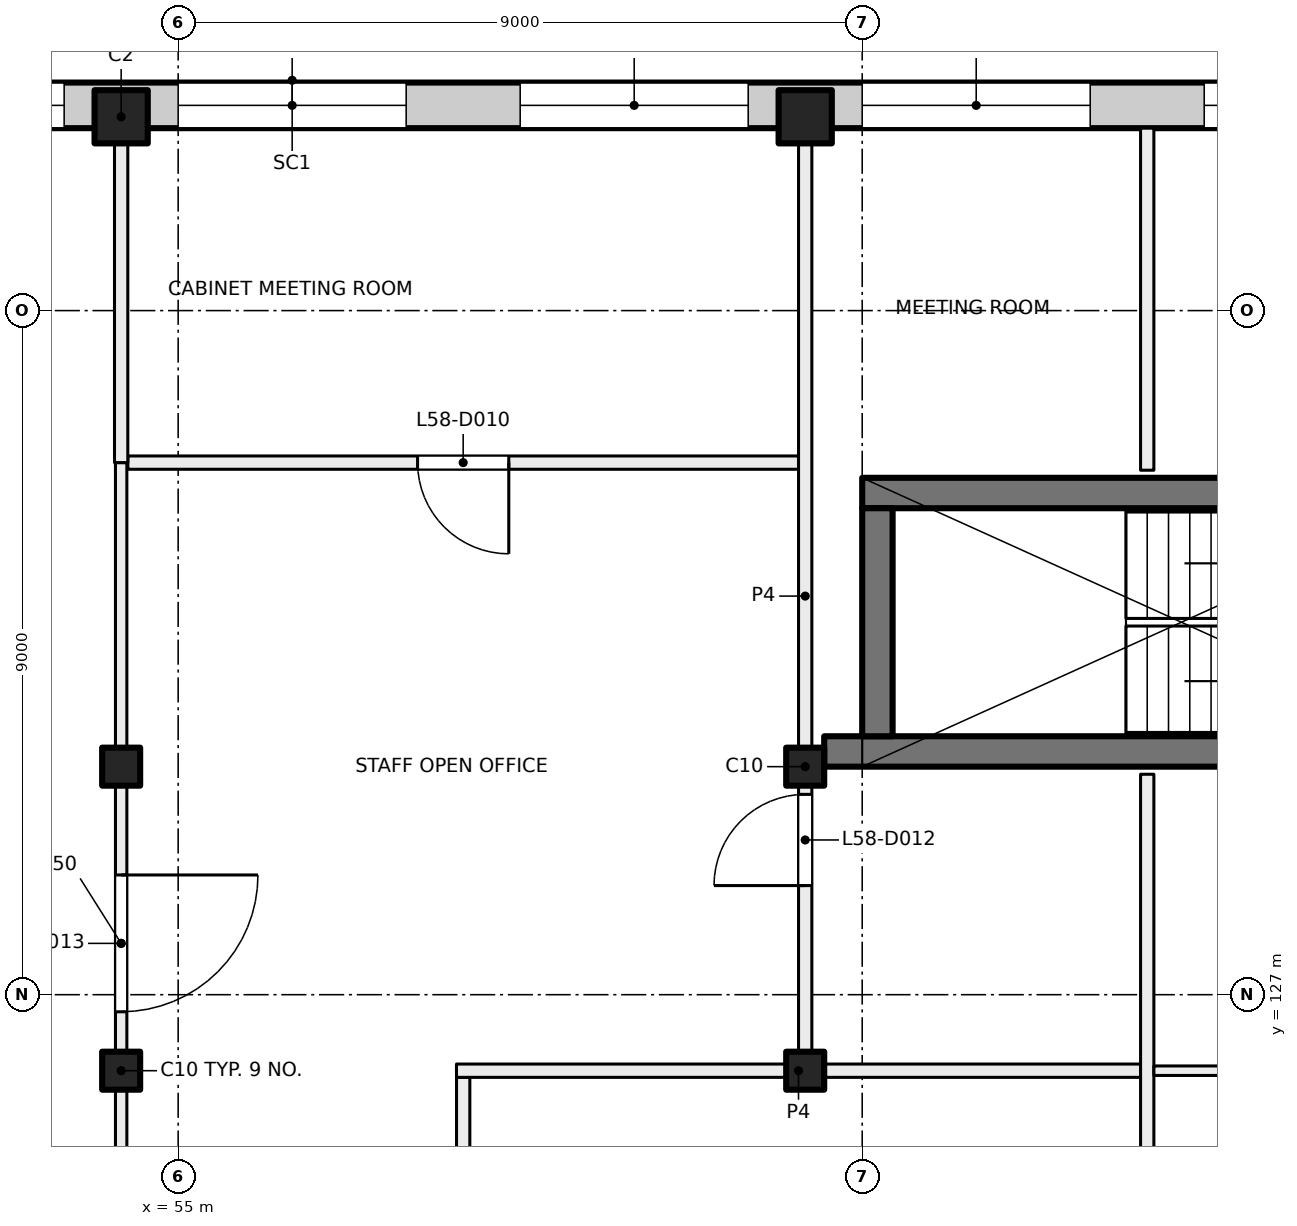
"""IFC4 building model, lengths in metres.
Left out: names, types, materials, properties, quantities, classifications, styles, units other than length and angle.
Written with IfcOpenShell. Run it as: python <this file> out.ifc"""

import sys

from ifc_helpers import new_model, si_unit, direction, frame, frame_2d, origin, origin_2d, place, context, subcontext, project, spatial, rectangle, extrude, element, fill, save


model = new_model("IFC4")
c1 = context("Model", 3, precision=1e-05, world=origin(), true_north=direction((0.0, 1.0)))
c2 = subcontext(c1, "Body", "Model", "MODEL_VIEW")
j1 = project(units=[si_unit("LENGTHUNIT", "METRE"), si_unit("PLANEANGLEUNIT", "RADIAN")], contexts=[c1])
p1 = place(None, origin())
s1 = spatial("IfcSite", under=j1, at=p1, CompositionType="ELEMENT")
p2 = place(p1, origin())
s2 = spatial("IfcBuilding", under=s1, at=p2, CompositionType="ELEMENT")
p3 = place(p2, frame((0.0, 0.0, 245.5)))
s3 = spatial("IfcBuildingStorey", under=s2, at=p3, CompositionType="ELEMENT", Elevation=245.5)
for number, where, z_axis, x_axis in (
    (1, (54.25, 130.0, 0.0), (0.0, 0.0, 1.0), (1.0, 0.0, 0.0)),
    (2, (63.25, 130.0, 0.0), (0.0, 0.0, 1.0), (1.0, 0.0, 0.0)),
    (3, (54.25, 126.0, 0.0), (0.0, 0.0, 1.0), (1.0, 0.0, 0.0)),
    (4, (63.25, 126.0, 0.0), (0.0, 0.0, 1.0), (1.0, 0.0, 0.0)),
):
    element("IfcColumn", number, at=place(p3, frame(where, z_axis=z_axis, x_axis=x_axis)), inside=s3, PredefinedType="COLUMN", context=c2, shape_type="SweptSolid", body=[
        extrude(rectangle(XDim=0.5, YDim=0.5, at=origin_2d()), origin(), (0.0, 0.0, 1.0), 4.0),
    ])
for number, where, z_axis, x_axis in (
    (5, (54.25, 138.55, 0.0), (0.0, 0.0, 1.0), (1.0, 0.0, 0.0)),
    (6, (63.25, 138.55, 0.0), (0.0, 0.0, 1.0), (1.0, 0.0, 0.0)),
):
    element("IfcColumn", number, at=place(p3, frame(where, z_axis=z_axis, x_axis=x_axis)), inside=s3, PredefinedType="COLUMN", context=c2, shape_type="SweptSolid", body=[
        extrude(rectangle(XDim=0.7, YDim=0.7, at=origin_2d()), origin(), (0.0, 0.0, 1.0), 4.0),
    ])
p4 = place(p3, frame((63.5, 130.2, 0.0), z_axis=(0.0, 0.0, 1.0), x_axis=(1.0, 0.0, 0.0)))
e7 = element("IfcWall", 7, at=p4, inside=s3, PredefinedType="SHEAR", context=c2, shape_type="SweptSolid", body=[
    extrude(rectangle(XDim=8.9, YDim=0.4, at=frame_2d((4.45, 0.0))), origin(), (0.0, 0.0, 1.0), 4.0),
])
p5 = place(p4, frame((7.275, 0.0, 0.0)))
e8 = element("IfcOpeningElement", 8, at=p5, cuts=e7, PredefinedType="OPENING", context=c2, shape_type="SweptSolid", body=[
    extrude(rectangle(XDim=1.0, YDim=2.1, at=frame_2d((0.5, 1.05))), frame((0.0, 0.21, 0.0), z_axis=(0.0, -1.0, 0.0), x_axis=(1.0, 0.0, 0.0)), (0.0, 0.0, 1.0), 0.42),
])
p6 = place(p3, frame((64.0, 133.6, 0.0), z_axis=(0.0, 0.0, 1.0), x_axis=(1.0, 0.0, 0.0)))
e9 = element("IfcWall", 9, at=p6, inside=s3, PredefinedType="SHEAR", context=c2, shape_type="SweptSolid", body=[
    extrude(rectangle(XDim=8.4, YDim=0.4, at=frame_2d((4.2, 0.0))), origin(), (0.0, 0.0, 1.0), 4.0),
])
p7 = place(p3, frame((64.2, 130.4, 0.0), z_axis=(0.0, 0.0, 1.0), x_axis=(0.0, 1.0, 0.0)))
e10 = element("IfcWall", 10, at=p7, inside=s3, PredefinedType="SHEAR", context=c2, shape_type="SweptSolid", body=[
    extrude(rectangle(XDim=3.0, YDim=0.4, at=frame_2d((1.5, 0.0))), origin(), (0.0, 0.0, 1.0), 4.0),
])
p8 = place(p3, frame((47.07, 138.7, 0.0), z_axis=(0.0, 0.0, 1.0), x_axis=(1.0, 0.0, 0.0)))
e11 = element("IfcWall", 11, at=p8, inside=s3, PredefinedType="SOLIDWALL", context=c2, shape_type="SweptSolid", body=[
    extrude(rectangle(XDim=43.91, YDim=0.6, at=frame_2d((21.955, 0.0))), origin(), (0.0, 0.0, 1.0), 3.625),
])
p9 = place(p8, frame((3.43, 0.0, 0.9)))
e12 = element("IfcOpeningElement", 12, at=p9, cuts=e11, PredefinedType="OPENING", context=c2, shape_type="SweptSolid", body=[
    extrude(rectangle(XDim=3.0, YDim=2.4, at=frame_2d((1.5, 1.2))), frame((0.0, 0.31, 0.0), z_axis=(0.0, -1.0, 0.0), x_axis=(1.0, 0.0, 0.0)), (0.0, 0.0, 1.0), 0.62),
])
p10 = place(p8, frame((7.93, 0.0, 0.9)))
e13 = element("IfcOpeningElement", 13, at=p10, cuts=e11, PredefinedType="OPENING", context=c2, shape_type="SweptSolid", body=[
    extrude(rectangle(XDim=3.0, YDim=2.4, at=frame_2d((1.5, 1.2))), frame((0.0, 0.31, 0.0), z_axis=(0.0, -1.0, 0.0), x_axis=(1.0, 0.0, 0.0)), (0.0, 0.0, 1.0), 0.62),
])
p11 = place(p8, frame((12.43, 0.0, 0.9)))
e14 = element("IfcOpeningElement", 14, at=p11, cuts=e11, PredefinedType="OPENING", context=c2, shape_type="SweptSolid", body=[
    extrude(rectangle(XDim=3.0, YDim=2.4, at=frame_2d((1.5, 1.2))), frame((0.0, 0.31, 0.0), z_axis=(0.0, -1.0, 0.0), x_axis=(1.0, 0.0, 0.0)), (0.0, 0.0, 1.0), 0.62),
])
p12 = place(p8, frame((16.93, 0.0, 0.9)))
e15 = element("IfcOpeningElement", 15, at=p12, cuts=e11, PredefinedType="OPENING", context=c2, shape_type="SweptSolid", body=[
    extrude(rectangle(XDim=3.0, YDim=2.4, at=frame_2d((1.5, 1.2))), frame((0.0, 0.31, 0.0), z_axis=(0.0, -1.0, 0.0), x_axis=(1.0, 0.0, 0.0)), (0.0, 0.0, 1.0), 0.62),
])
p13 = place(p8, frame((21.43, 0.0, 0.9)))
e16 = element("IfcOpeningElement", 16, at=p13, cuts=e11, PredefinedType="OPENING", context=c2, shape_type="SweptSolid", body=[
    extrude(rectangle(XDim=3.0, YDim=2.4, at=frame_2d((1.5, 1.2))), frame((0.0, 0.31, 0.0), z_axis=(0.0, -1.0, 0.0), x_axis=(1.0, 0.0, 0.0)), (0.0, 0.0, 1.0), 0.62),
])
p14 = place(p8, frame((25.93, 0.0, 0.9)))
e17 = element("IfcOpeningElement", 17, at=p14, cuts=e11, PredefinedType="OPENING", context=c2, shape_type="SweptSolid", body=[
    extrude(rectangle(XDim=3.0, YDim=2.4, at=frame_2d((1.5, 1.2))), frame((0.0, 0.31, 0.0), z_axis=(0.0, -1.0, 0.0), x_axis=(1.0, 0.0, 0.0)), (0.0, 0.0, 1.0), 0.62),
])
p15 = place(p8, frame((30.43, 0.0, 0.9)))
e18 = element("IfcOpeningElement", 18, at=p15, cuts=e11, PredefinedType="OPENING", context=c2, shape_type="SweptSolid", body=[
    extrude(rectangle(XDim=3.0, YDim=2.4, at=frame_2d((1.5, 1.2))), frame((0.0, 0.31, 0.0), z_axis=(0.0, -1.0, 0.0), x_axis=(1.0, 0.0, 0.0)), (0.0, 0.0, 1.0), 0.62),
])
p16 = place(p8, frame((34.93, 0.0, 0.9)))
e19 = element("IfcOpeningElement", 19, at=p16, cuts=e11, PredefinedType="OPENING", context=c2, shape_type="SweptSolid", body=[
    extrude(rectangle(XDim=3.0, YDim=2.4, at=frame_2d((1.5, 1.2))), frame((0.0, 0.31, 0.0), z_axis=(0.0, -1.0, 0.0), x_axis=(1.0, 0.0, 0.0)), (0.0, 0.0, 1.0), 0.62),
])
p17 = place(p8, frame((39.43, 0.0, 0.9)))
e20 = element("IfcOpeningElement", 20, at=p17, cuts=e11, PredefinedType="OPENING", context=c2, shape_type="SweptSolid", body=[
    extrude(rectangle(XDim=3.0, YDim=2.4, at=frame_2d((1.5, 1.2))), frame((0.0, 0.31, 0.0), z_axis=(0.0, -1.0, 0.0), x_axis=(1.0, 0.0, 0.0)), (0.0, 0.0, 1.0), 0.62),
])
p18 = place(p3, frame((54.25, 134.0, 0.0), z_axis=(0.0, 0.0, 1.0), x_axis=(0.0, -1.0, 0.0)))
e21 = element("IfcWall", 21, at=p18, inside=s3, PredefinedType="PARTITIONING", context=c2, shape_type="SweptSolid", body=[
    extrude(rectangle(XDim=12.65, YDim=0.15, at=frame_2d((6.325, 0.0))), origin(), (0.0, 0.0, 1.0), 3.625),
])
p19 = place(p18, frame((5.425, 0.0, 0.0)))
e22 = element("IfcOpeningElement", 22, at=p19, cuts=e21, PredefinedType="OPENING", context=c2, shape_type="SweptSolid", body=[
    extrude(rectangle(XDim=1.8, YDim=2.1, at=frame_2d((0.9, 1.05))), frame((0.0, 0.085, 0.0), z_axis=(0.0, -1.0, 0.0), x_axis=(1.0, 0.0, 0.0)), (0.0, 0.0, 1.0), 0.17),
])
p20 = place(p3, frame((63.162, 134.0, 0.0), z_axis=(0.0, 0.0, 1.0), x_axis=(-1.0, 0.0, 0.0)))
e23 = element("IfcWall", 23, at=p20, inside=s3, PredefinedType="PARTITIONING", context=c2, shape_type="SweptSolid", body=[
    extrude(rectangle(XDim=8.824, YDim=0.175, at=frame_2d((4.412, 0.0))), origin(), (0.0, 0.0, 1.0), 3.625),
])
p21 = place(p20, frame((3.812, 0.0, 0.0)))
e24 = element("IfcOpeningElement", 24, at=p21, cuts=e23, PredefinedType="OPENING", context=c2, shape_type="SweptSolid", body=[
    extrude(rectangle(XDim=1.2, YDim=2.1, at=frame_2d((0.6, 1.05))), frame((0.0, 0.097, 0.0), z_axis=(0.0, -1.0, 0.0), x_axis=(1.0, 0.0, 0.0)), (0.0, 0.0, 1.0), 0.195),
])
p22 = place(p3, frame((54.25, 138.4, 0.0), z_axis=(0.0, 0.0, 1.0), x_axis=(0.0, -1.0, 0.0)))
e25 = element("IfcWall", 25, at=p22, inside=s3, PredefinedType="PARTITIONING", context=c2, shape_type="SweptSolid", body=[
    extrude(rectangle(XDim=4.4, YDim=0.175, at=frame_2d((2.2, 0.0))), origin(), (0.0, 0.0, 1.0), 3.625),
])
p23 = place(p3, frame((58.75, 125.912, 0.0), z_axis=(0.0, 0.0, 1.0), x_axis=(0.0, -1.0, 0.0)))
e26 = element("IfcWall", 26, at=p23, inside=s3, PredefinedType="PARTITIONING", context=c2, shape_type="SweptSolid", body=[
    extrude(rectangle(XDim=4.412, YDim=0.175, at=frame_2d((2.206, 0.0))), origin(), (0.0, 0.0, 1.0), 3.625),
])
p24 = place(p3, frame((58.662, 126.0, 0.0), z_axis=(0.0, 0.0, 1.0), x_axis=(1.0, 0.0, 0.0)))
e27 = element("IfcWall", 27, at=p24, inside=s3, PredefinedType="PARTITIONING", context=c2, shape_type="SweptSolid", body=[
    extrude(rectangle(XDim=9.0, YDim=0.175, at=frame_2d((4.5, 0.0))), origin(), (0.0, 0.0, 1.0), 3.625),
])
p25 = place(p3, frame((63.25, 126.088, 0.0), z_axis=(0.0, 0.0, 1.0), x_axis=(0.0, 1.0, 0.0)))
e28 = element("IfcWall", 28, at=p25, inside=s3, PredefinedType="PARTITIONING", context=c2, shape_type="SweptSolid", body=[
    extrude(rectangle(XDim=12.312, YDim=0.175, at=frame_2d((6.156, 0.0))), origin(), (0.0, 0.0, 1.0), 3.625),
])
p26 = place(p25, frame((2.347, 0.0, 0.0)))
e29 = element("IfcOpeningElement", 29, at=p26, cuts=e28, PredefinedType="OPENING", context=c2, shape_type="SweptSolid", body=[
    extrude(rectangle(XDim=1.2, YDim=2.1, at=frame_2d((0.6, 1.05))), frame((0.0, 0.097, 0.0), z_axis=(0.0, -1.0, 0.0), x_axis=(1.0, 0.0, 0.0)), (0.0, 0.0, 1.0), 0.195),
])
p27 = place(p3, frame((67.75, 121.5, 0.0), z_axis=(0.0, 0.0, 1.0), x_axis=(0.0, 1.0, 0.0)))
e30 = element("IfcWall", 30, at=p27, inside=s3, PredefinedType="PARTITIONING", context=c2, shape_type="SweptSolid", body=[
    extrude(rectangle(XDim=8.4, YDim=0.175, at=frame_2d((4.2, 0.0))), origin(), (0.0, 0.0, 1.0), 3.625),
])
p28 = place(p3, frame((67.838, 126.0, 0.0), z_axis=(0.0, 0.0, 1.0), x_axis=(1.0, 0.0, 0.0)))
e31 = element("IfcWall", 31, at=p28, inside=s3, PredefinedType="PARTITIONING", context=c2, shape_type="SweptSolid", body=[
    extrude(rectangle(XDim=8.974, YDim=0.125, at=frame_2d((4.487, 0.0))), origin(), (0.0, 0.0, 1.0), 3.625),
])
p29 = place(p3, frame((67.75, 133.9, 0.0), z_axis=(0.0, 0.0, 1.0), x_axis=(0.0, 1.0, 0.0)))
e32 = element("IfcWall", 32, at=p29, inside=s3, PredefinedType="PARTITIONING", context=c2, shape_type="SweptSolid", body=[
    extrude(rectangle(XDim=4.5, YDim=0.175, at=frame_2d((2.25, 0.0))), origin(), (0.0, 0.0, 1.0), 3.625),
])
p30 = place(p9, origin())
e33 = element("IfcWindow", 33, at=p30, inside=s3, PartitioningType="SINGLE_PANEL", PredefinedType="WINDOW", context=c2, shape_type="SweptSolid", body=[
    extrude(rectangle(XDim=3.0, YDim=2.4, at=frame_2d((1.5, 1.2))), frame((0.0, 0.03, 0.0), z_axis=(0.0, -1.0, 0.0), x_axis=(1.0, 0.0, 0.0)), (0.0, 0.0, 1.0), 0.06),
])
fill(e12, e33)
p31 = place(p10, origin())
e34 = element("IfcWindow", 34, at=p31, inside=s3, PartitioningType="SINGLE_PANEL", PredefinedType="WINDOW", context=c2, shape_type="SweptSolid", body=[
    extrude(rectangle(XDim=3.0, YDim=2.4, at=frame_2d((1.5, 1.2))), frame((0.0, 0.03, 0.0), z_axis=(0.0, -1.0, 0.0), x_axis=(1.0, 0.0, 0.0)), (0.0, 0.0, 1.0), 0.06),
])
fill(e13, e34)
p32 = place(p11, origin())
e35 = element("IfcWindow", 35, at=p32, inside=s3, PartitioningType="SINGLE_PANEL", PredefinedType="WINDOW", context=c2, shape_type="SweptSolid", body=[
    extrude(rectangle(XDim=3.0, YDim=2.4, at=frame_2d((1.5, 1.2))), frame((0.0, 0.03, 0.0), z_axis=(0.0, -1.0, 0.0), x_axis=(1.0, 0.0, 0.0)), (0.0, 0.0, 1.0), 0.06),
])
fill(e14, e35)
p33 = place(p12, origin())
e36 = element("IfcWindow", 36, at=p33, inside=s3, PartitioningType="SINGLE_PANEL", PredefinedType="WINDOW", context=c2, shape_type="SweptSolid", body=[
    extrude(rectangle(XDim=3.0, YDim=2.4, at=frame_2d((1.5, 1.2))), frame((0.0, 0.03, 0.0), z_axis=(0.0, -1.0, 0.0), x_axis=(1.0, 0.0, 0.0)), (0.0, 0.0, 1.0), 0.06),
])
fill(e15, e36)
p34 = place(p13, origin())
e37 = element("IfcWindow", 37, at=p34, inside=s3, PartitioningType="SINGLE_PANEL", PredefinedType="WINDOW", context=c2, shape_type="SweptSolid", body=[
    extrude(rectangle(XDim=3.0, YDim=2.4, at=frame_2d((1.5, 1.2))), frame((0.0, 0.03, 0.0), z_axis=(0.0, -1.0, 0.0), x_axis=(1.0, 0.0, 0.0)), (0.0, 0.0, 1.0), 0.06),
])
fill(e16, e37)
p35 = place(p21, origin())
e38 = element("IfcDoor", 38, at=p35, inside=s3, OperationType="DOUBLE_DOOR_SINGLE_SWING", PredefinedType="DOOR", context=c2, shape_type="SweptSolid", body=[
    extrude(rectangle(XDim=1.2, YDim=2.1, at=frame_2d((0.6, 1.05))), frame((0.0, 0.025, 0.0), z_axis=(0.0, -1.0, 0.0), x_axis=(1.0, 0.0, 0.0)), (0.0, 0.0, 1.0), 0.05),
])
fill(e24, e38)
p36 = place(p26, origin())
e39 = element("IfcDoor", 39, at=p36, inside=s3, OperationType="DOUBLE_DOOR_SINGLE_SWING", PredefinedType="DOOR", context=c2, shape_type="SweptSolid", body=[
    extrude(rectangle(XDim=1.2, YDim=2.1, at=frame_2d((0.6, 1.05))), frame((0.0, 0.025, 0.0), z_axis=(0.0, -1.0, 0.0), x_axis=(1.0, 0.0, 0.0)), (0.0, 0.0, 1.0), 0.05),
])
fill(e29, e39)
p37 = place(p19, origin())
e40 = element("IfcDoor", 40, at=p37, inside=s3, OperationType="DOUBLE_DOOR_SINGLE_SWING", PredefinedType="DOOR", context=c2, shape_type="SweptSolid", body=[
    extrude(rectangle(XDim=1.8, YDim=2.1, at=frame_2d((0.9, 1.05))), frame((0.0, 0.025, 0.0), z_axis=(0.0, -1.0, 0.0), x_axis=(1.0, 0.0, 0.0)), (0.0, 0.0, 1.0), 0.05),
])
fill(e22, e40)
save(model, sys.argv[1])
